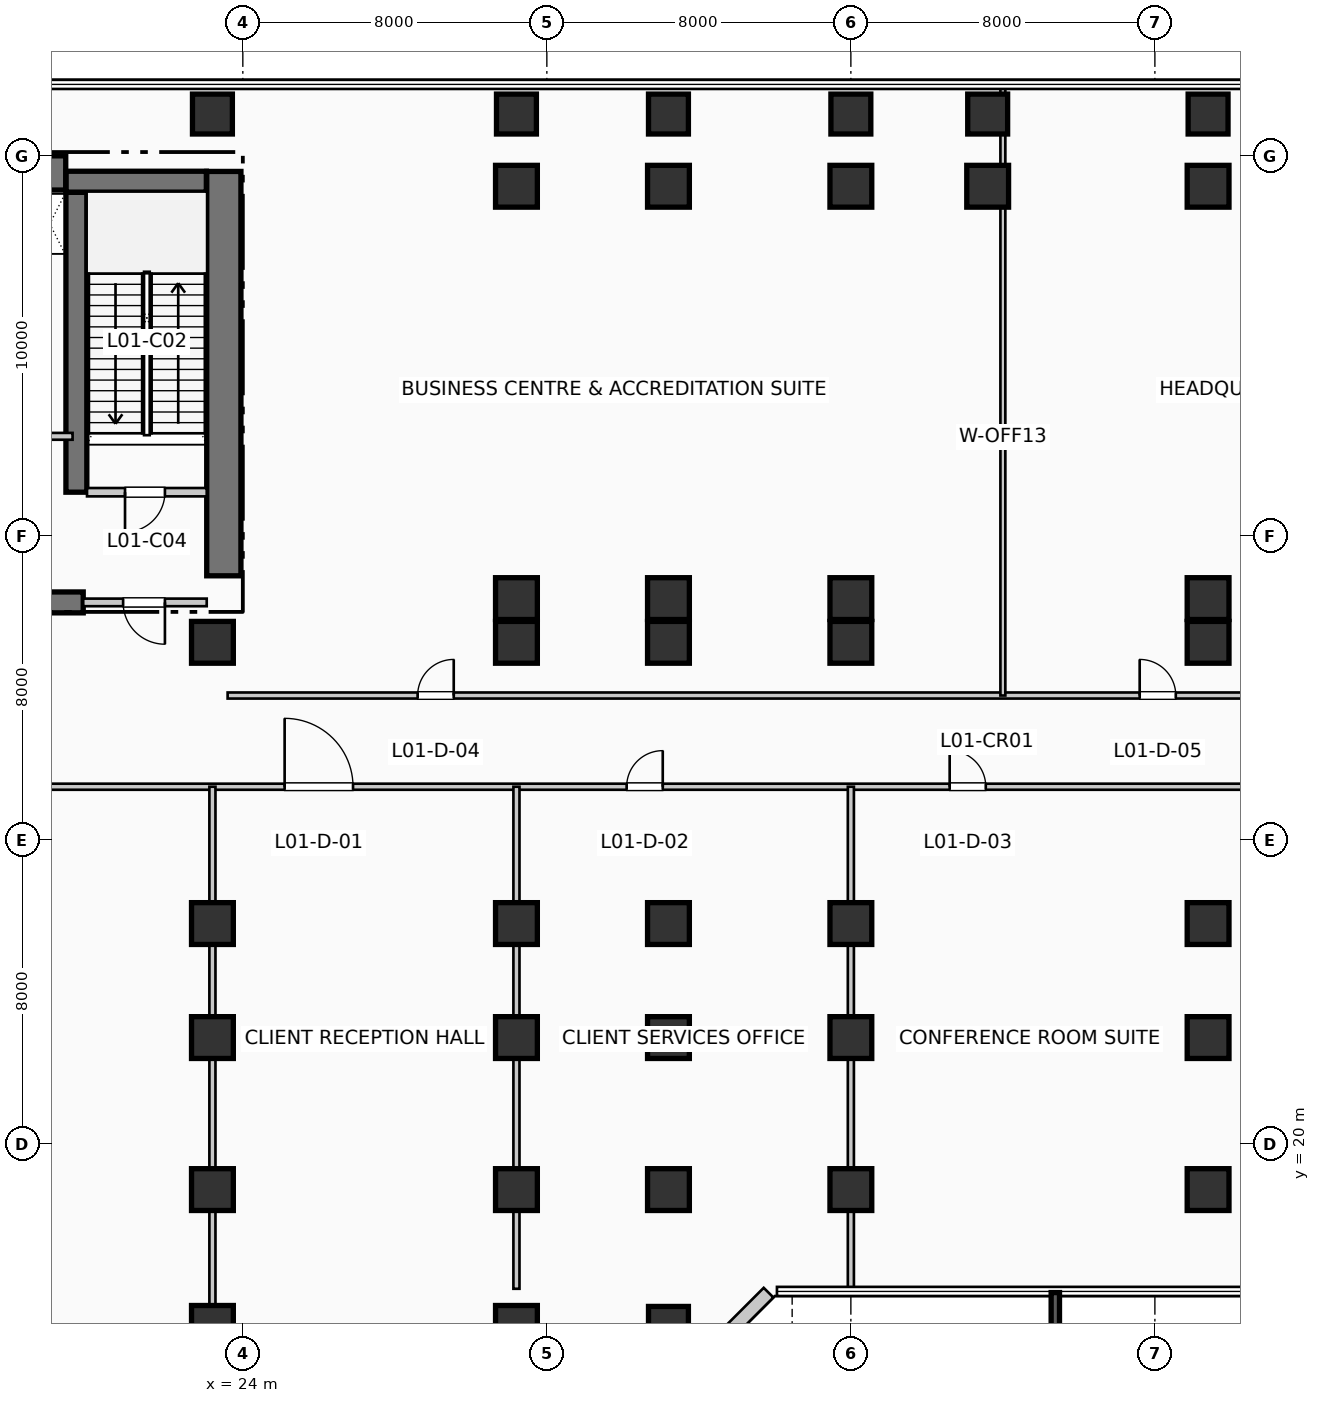
"""IFC4 building model, lengths in metres.
Left out: names, types, materials, properties, quantities, classifications, styles, units other than length and angle.
Written with IfcOpenShell. Run it as: python <this file> out.ifc"""

import sys

from ifc_helpers import new_model, si_unit, direction, frame, frame_2d, origin, origin_2d, place, context, subcontext, project, spatial, rectangle, extrude, element, fill, save


model = new_model("IFC4")
c1 = context("Model", 3, precision=1e-05, world=origin(), true_north=direction((0.0, 1.0)))
c2 = subcontext(c1, "Body", "Model", "MODEL_VIEW")
j1 = project(units=[si_unit("LENGTHUNIT", "METRE"), si_unit("PLANEANGLEUNIT", "RADIAN")], contexts=[c1])
p1 = place(None, origin())
s1 = spatial("IfcSite", under=j1, at=p1, CompositionType="ELEMENT")
p2 = place(p1, origin())
s2 = spatial("IfcBuilding", under=s1, at=p2, CompositionType="ELEMENT")
p3 = place(p2, frame((0.0, 0.0, 5.94)))
s3 = spatial("IfcBuildingStorey", under=s2, at=p3, CompositionType="ELEMENT", Elevation=5.94)
p4 = place(p3, frame((5.36, 45.55, 0.0), z_axis=(0.0, 0.0, 1.0), x_axis=(1.0, 0.0, 0.0)))
e1 = element("IfcWall", 1, at=p4, inside=s3, PredefinedType="SHEAR", context=c2, shape_type="SweptSolid", body=[
    extrude(rectangle(XDim=13.98, YDim=0.9, at=frame_2d((6.99, 0.0))), origin(), (0.0, 0.0, 1.0), 5.28),
])
p5 = place(p3, frame((23.5, 34.95, 0.0), z_axis=(0.0, 0.0, 1.0), x_axis=(0.0, 1.0, 0.0)))
e2 = element("IfcWall", 2, at=p5, inside=s3, PredefinedType="SHEAR", context=c2, shape_type="SweptSolid", body=[
    extrude(rectangle(XDim=10.64, YDim=0.9, at=frame_2d((5.32, 0.0))), origin(), (0.0, 0.0, 1.0), 5.28),
])
p6 = place(p3, frame((13.68, 34.25, 0.0), z_axis=(0.0, 0.0, 1.0), x_axis=(1.0, 0.0, 0.0)))
e3 = element("IfcWall", 3, at=p6, inside=s3, PredefinedType="SHEAR", context=c2, shape_type="SweptSolid", body=[
    extrude(rectangle(XDim=6.12, YDim=0.55, at=frame_2d((3.06, 0.0))), origin(), (0.0, 0.0, 1.0), 5.28),
])
p7 = place(p3, frame((19.62, 37.15, 0.0), z_axis=(0.0, 0.0, 1.0), x_axis=(0.0, 1.0, 0.0)))
e4 = element("IfcWall", 4, at=p7, inside=s3, PredefinedType="SHEAR", context=c2, shape_type="SweptSolid", body=[
    extrude(rectangle(XDim=7.89, YDim=0.55, at=frame_2d((3.945, 0.0))), origin(), (0.0, 0.0, 1.0), 5.28),
])
p8 = place(p3, frame((19.35, 45.32, 0.0), z_axis=(0.0, 0.0, 1.0), x_axis=(1.0, 0.0, 0.0)))
e5 = element("IfcWall", 5, at=p8, inside=s3, PredefinedType="SHEAR", context=c2, shape_type="SweptSolid", body=[
    extrude(rectangle(XDim=3.69, YDim=0.55, at=frame_2d((1.845, 0.0))), origin(), (0.0, 0.0, 1.0), 5.28),
])
for number, where, z_axis, x_axis in (
    (6, (23.2, 15.2, 0.0), (0.0, 0.0, 1.0), (1.0, 0.0, 0.0)),
    (7, (23.2, 18.8, 0.0), (0.0, 0.0, 1.0), (1.0, 0.0, 0.0)),
    (8, (23.2, 22.8, 0.0), (0.0, 0.0, 1.0), (1.0, 0.0, 0.0)),
    (9, (23.2, 25.8, 0.0), (0.0, 0.0, 1.0), (1.0, 0.0, 0.0)),
    (10, (23.2, 33.2, 0.0), (0.0, 0.0, 1.0), (1.0, 0.0, 0.0)),
):
    element("IfcColumn", number, at=place(p3, frame(where, z_axis=z_axis, x_axis=x_axis)), inside=s3, PredefinedType="COLUMN", context=c2, shape_type="SweptSolid", body=[
        extrude(rectangle(XDim=1.1, YDim=1.1, at=origin_2d()), origin(), (0.0, 0.0, 1.0), 5.28),
    ])
p9 = place(p3, frame((23.2, 47.1, 0.0), z_axis=(0.0, 0.0, 1.0), x_axis=(1.0, 0.0, 0.0)))
e11 = element("IfcColumn", 11, at=p9, inside=s3, PredefinedType="COLUMN", context=c2, shape_type="SweptSolid", body=[
    extrude(rectangle(XDim=1.05, YDim=1.05, at=origin_2d()), origin(), (0.0, 0.0, 1.0), 5.28),
])
for number, where, z_axis, x_axis in (
    (12, (31.2, 15.2, 0.0), (0.0, 0.0, 1.0), (1.0, 0.0, 0.0)),
    (13, (31.2, 18.8, 0.0), (0.0, 0.0, 1.0), (1.0, 0.0, 0.0)),
    (14, (31.2, 22.8, 0.0), (0.0, 0.0, 1.0), (1.0, 0.0, 0.0)),
    (15, (31.2, 25.8, 0.0), (0.0, 0.0, 1.0), (1.0, 0.0, 0.0)),
    (16, (31.2, 33.2, 0.0), (0.0, 0.0, 1.0), (1.0, 0.0, 0.0)),
    (17, (31.2, 34.35, 0.0), (0.0, 0.0, 1.0), (1.0, 0.0, 0.0)),
    (18, (31.2, 45.2, 0.0), (0.0, 0.0, 1.0), (1.0, 0.0, 0.0)),
):
    element("IfcColumn", number, at=place(p3, frame(where, z_axis=z_axis, x_axis=x_axis)), inside=s3, PredefinedType="COLUMN", context=c2, shape_type="SweptSolid", body=[
        extrude(rectangle(XDim=1.1, YDim=1.1, at=origin_2d()), origin(), (0.0, 0.0, 1.0), 5.28),
    ])
for number, where, z_axis, x_axis in (
    (19, (31.2, 47.1, 0.0), (0.0, 0.0, 1.0), (1.0, 0.0, 0.0)),
    (20, (35.2, 15.2, 0.0), (0.0, 0.0, 1.0), (1.0, 0.0, 0.0)),
):
    element("IfcColumn", number, at=place(p3, frame(where, z_axis=z_axis, x_axis=x_axis)), inside=s3, PredefinedType="COLUMN", context=c2, shape_type="SweptSolid", body=[
        extrude(rectangle(XDim=1.05, YDim=1.05, at=origin_2d()), origin(), (0.0, 0.0, 1.0), 5.28),
    ])
for number, where, z_axis, x_axis in (
    (21, (35.2, 18.8, 0.0), (0.0, 0.0, 1.0), (1.0, 0.0, 0.0)),
    (22, (35.2, 22.8, 0.0), (0.0, 0.0, 1.0), (1.0, 0.0, 0.0)),
    (23, (35.2, 25.8, 0.0), (0.0, 0.0, 1.0), (1.0, 0.0, 0.0)),
    (24, (35.2, 33.2, 0.0), (0.0, 0.0, 1.0), (1.0, 0.0, 0.0)),
    (25, (35.2, 34.35, 0.0), (0.0, 0.0, 1.0), (1.0, 0.0, 0.0)),
    (26, (35.2, 45.2, 0.0), (0.0, 0.0, 1.0), (1.0, 0.0, 0.0)),
):
    element("IfcColumn", number, at=place(p3, frame(where, z_axis=z_axis, x_axis=x_axis)), inside=s3, PredefinedType="COLUMN", context=c2, shape_type="SweptSolid", body=[
        extrude(rectangle(XDim=1.1, YDim=1.1, at=origin_2d()), origin(), (0.0, 0.0, 1.0), 5.28),
    ])
p10 = place(p3, frame((35.2, 47.1, 0.0), z_axis=(0.0, 0.0, 1.0), x_axis=(1.0, 0.0, 0.0)))
e27 = element("IfcColumn", 27, at=p10, inside=s3, PredefinedType="COLUMN", context=c2, shape_type="SweptSolid", body=[
    extrude(rectangle(XDim=1.05, YDim=1.05, at=origin_2d()), origin(), (0.0, 0.0, 1.0), 5.28),
])
for number, where, z_axis, x_axis in (
    (28, (40.0, 18.8, 0.0), (0.0, 0.0, 1.0), (1.0, 0.0, 0.0)),
    (29, (40.0, 22.8, 0.0), (0.0, 0.0, 1.0), (1.0, 0.0, 0.0)),
    (30, (40.0, 25.8, 0.0), (0.0, 0.0, 1.0), (1.0, 0.0, 0.0)),
    (31, (40.0, 33.2, 0.0), (0.0, 0.0, 1.0), (1.0, 0.0, 0.0)),
    (32, (40.0, 34.35, 0.0), (0.0, 0.0, 1.0), (1.0, 0.0, 0.0)),
    (33, (40.0, 45.2, 0.0), (0.0, 0.0, 1.0), (1.0, 0.0, 0.0)),
):
    element("IfcColumn", number, at=place(p3, frame(where, z_axis=z_axis, x_axis=x_axis)), inside=s3, PredefinedType="COLUMN", context=c2, shape_type="SweptSolid", body=[
        extrude(rectangle(XDim=1.1, YDim=1.1, at=origin_2d()), origin(), (0.0, 0.0, 1.0), 5.28),
    ])
p11 = place(p3, frame((40.0, 47.1, 0.0), z_axis=(0.0, 0.0, 1.0), x_axis=(1.0, 0.0, 0.0)))
e34 = element("IfcColumn", 34, at=p11, inside=s3, PredefinedType="COLUMN", context=c2, shape_type="SweptSolid", body=[
    extrude(rectangle(XDim=1.05, YDim=1.05, at=origin_2d()), origin(), (0.0, 0.0, 1.0), 5.28),
])
p12 = place(p3, frame((43.6, 45.2, 0.0), z_axis=(0.0, 0.0, 1.0), x_axis=(1.0, 0.0, 0.0)))
e35 = element("IfcColumn", 35, at=p12, inside=s3, PredefinedType="COLUMN", context=c2, shape_type="SweptSolid", body=[
    extrude(rectangle(XDim=1.1, YDim=1.1, at=origin_2d()), origin(), (0.0, 0.0, 1.0), 5.28),
])
p13 = place(p3, frame((43.6, 47.1, 0.0), z_axis=(0.0, 0.0, 1.0), x_axis=(1.0, 0.0, 0.0)))
e36 = element("IfcColumn", 36, at=p13, inside=s3, PredefinedType="COLUMN", context=c2, shape_type="SweptSolid", body=[
    extrude(rectangle(XDim=1.05, YDim=1.05, at=origin_2d()), origin(), (0.0, 0.0, 1.0), 5.28),
])
for number, where, z_axis, x_axis in (
    (37, (49.4, 18.8, 0.0), (0.0, 0.0, 1.0), (1.0, 0.0, 0.0)),
    (38, (49.4, 22.8, 0.0), (0.0, 0.0, 1.0), (1.0, 0.0, 0.0)),
    (39, (49.4, 25.8, 0.0), (0.0, 0.0, 1.0), (1.0, 0.0, 0.0)),
    (40, (49.4, 33.2, 0.0), (0.0, 0.0, 1.0), (1.0, 0.0, 0.0)),
    (41, (49.4, 34.35, 0.0), (0.0, 0.0, 1.0), (1.0, 0.0, 0.0)),
    (42, (49.4, 45.2, 0.0), (0.0, 0.0, 1.0), (1.0, 0.0, 0.0)),
):
    element("IfcColumn", number, at=place(p3, frame(where, z_axis=z_axis, x_axis=x_axis)), inside=s3, PredefinedType="COLUMN", context=c2, shape_type="SweptSolid", body=[
        extrude(rectangle(XDim=1.1, YDim=1.1, at=origin_2d()), origin(), (0.0, 0.0, 1.0), 5.28),
    ])
p14 = place(p3, frame((49.4, 47.1, 0.0), z_axis=(0.0, 0.0, 1.0), x_axis=(1.0, 0.0, 0.0)))
e43 = element("IfcColumn", 43, at=p14, inside=s3, PredefinedType="COLUMN", context=c2, shape_type="SweptSolid", body=[
    extrude(rectangle(XDim=1.05, YDim=1.05, at=origin_2d()), origin(), (0.0, 0.0, 1.0), 5.28),
])
p15 = place(p3, frame((35.912, 14.166, 0.0), z_axis=(0.0, 0.0, 1.0), x_axis=(0.707106781187, 0.707106781187, 0.0)))
e44 = element("IfcWall", 44, at=p15, inside=s3, PredefinedType="SOLIDWALL", context=c2, shape_type="SweptSolid", body=[
    extrude(rectangle(XDim=2.718, YDim=0.36, at=frame_2d((1.359, 0.0))), origin(), (0.0, 0.0, 1.0), 4.96),
])
p16 = place(p3, frame((19.9, 37.15, 0.0), z_axis=(0.0, 0.0, 1.0), x_axis=(1.0, 0.0, 0.0)))
e45 = element("IfcWall", 45, at=p16, inside=s3, PredefinedType="PARTITIONING", context=c2, shape_type="SweptSolid", body=[
    extrude(rectangle(XDim=3.15, YDim=0.22, at=frame_2d((1.575, 0.0))), origin(), (0.0, 0.0, 1.0), 4.96),
])
p17 = place(p16, frame((2.05, 0.0, 0.0), z_axis=(0.0, 0.0, 1.0), x_axis=(-1.0, 0.0, 0.0)))
e46 = element("IfcOpeningElement", 46, at=p17, cuts=e45, PredefinedType="OPENING", context=c2, shape_type="SweptSolid", body=[
    extrude(rectangle(XDim=1.05, YDim=2.15, at=frame_2d((0.525, 1.075))), frame((0.0, 0.12, 0.0), z_axis=(0.0, -1.0, 0.0), x_axis=(1.0, 0.0, 0.0)), (0.0, 0.0, 1.0), 0.24),
])
p18 = place(p3, frame((19.8, 34.25, 0.0), z_axis=(0.0, 0.0, 1.0), x_axis=(1.0, 0.0, 0.0)))
e47 = element("IfcWall", 47, at=p18, inside=s3, PredefinedType="PARTITIONING", context=c2, shape_type="SweptSolid", body=[
    extrude(rectangle(XDim=3.25, YDim=0.2, at=frame_2d((1.625, 0.0))), origin(), (0.0, 0.0, 1.0), 4.96),
])
p19 = place(p18, frame((2.15, 0.0, 0.0), z_axis=(0.0, 0.0, 1.0), x_axis=(-1.0, 0.0, 0.0)))
e48 = element("IfcOpeningElement", 48, at=p19, cuts=e47, PredefinedType="OPENING", context=c2, shape_type="SweptSolid", body=[
    extrude(rectangle(XDim=1.1, YDim=2.15, at=frame_2d((0.55, 1.075))), frame((0.0, 0.11, 0.0), z_axis=(0.0, -1.0, 0.0), x_axis=(1.0, 0.0, 0.0)), (0.0, 0.0, 1.0), 0.22),
])
p20 = place(p3, frame((17.68, 38.62, 0.0), z_axis=(0.0, 0.0, 1.0), x_axis=(1.0, 0.0, 0.0)))
e49 = element("IfcWall", 49, at=p20, inside=s3, PredefinedType="PARTITIONING", context=c2, shape_type="SweptSolid", body=[
    extrude(rectangle(XDim=1.84, YDim=0.18, at=frame_2d((0.92, 0.0))), origin(), (0.0, 0.0, 1.0), 4.96),
])
p21 = place(p20, frame((0.24, 0.0, 0.0)))
e50 = element("IfcOpeningElement", 50, at=p21, cuts=e49, PredefinedType="OPENING", context=c2, shape_type="SweptSolid", body=[
    extrude(rectangle(XDim=0.92, YDim=2.1, at=frame_2d((0.46, 1.05))), frame((0.0, 0.1, 0.0), z_axis=(0.0, -1.0, 0.0), x_axis=(1.0, 0.0, 0.0)), (0.0, 0.0, 1.0), 0.2),
])
p22 = place(p3, frame((7.6, 29.4, 0.0), z_axis=(0.0, 0.0, 1.0), x_axis=(1.0, 0.0, 0.0)))
e51 = element("IfcWall", 51, at=p22, inside=s3, PredefinedType="PARTITIONING", context=c2, shape_type="SweptSolid", body=[
    extrude(rectangle(XDim=43.75, YDim=0.16, at=frame_2d((21.875, 0.0))), origin(), (0.0, 0.0, 1.0), 4.615),
])
p23 = place(p22, frame((17.5, 0.0, 0.0)))
e52 = element("IfcOpeningElement", 52, at=p23, cuts=e51, PredefinedType="OPENING", context=c2, shape_type="SweptSolid", body=[
    extrude(rectangle(XDim=1.8, YDim=2.3, at=frame_2d((0.9, 1.15))), frame((0.0, 0.09, 0.0), z_axis=(0.0, -1.0, 0.0), x_axis=(1.0, 0.0, 0.0)), (0.0, 0.0, 1.0), 0.18),
])
p24 = place(p22, frame((1.6, 0.0, 0.0)))
e53 = element("IfcOpeningElement", 53, at=p24, cuts=e51, PredefinedType="OPENING", context=c2, shape_type="SweptSolid", body=[
    extrude(rectangle(XDim=0.95, YDim=2.15, at=frame_2d((0.475, 1.075))), frame((0.0, 0.09, 0.0), z_axis=(0.0, -1.0, 0.0), x_axis=(1.0, 0.0, 0.0)), (0.0, 0.0, 1.0), 0.18),
])
p25 = place(p22, frame((9.0, 0.0, 0.0)))
e54 = element("IfcOpeningElement", 54, at=p25, cuts=e51, PredefinedType="OPENING", context=c2, shape_type="SweptSolid", body=[
    extrude(rectangle(XDim=1.8, YDim=2.3, at=frame_2d((0.9, 1.15))), frame((0.0, 0.09, 0.0), z_axis=(0.0, -1.0, 0.0), x_axis=(1.0, 0.0, 0.0)), (0.0, 0.0, 1.0), 0.18),
])
p26 = place(p22, frame((26.5, 0.0, 0.0)))
e55 = element("IfcOpeningElement", 55, at=p26, cuts=e51, PredefinedType="OPENING", context=c2, shape_type="SweptSolid", body=[
    extrude(rectangle(XDim=0.95, YDim=2.15, at=frame_2d((0.475, 1.075))), frame((0.0, 0.09, 0.0), z_axis=(0.0, -1.0, 0.0), x_axis=(1.0, 0.0, 0.0)), (0.0, 0.0, 1.0), 0.18),
])
p27 = place(p22, frame((35.0, 0.0, 0.0)))
e56 = element("IfcOpeningElement", 56, at=p27, cuts=e51, PredefinedType="OPENING", context=c2, shape_type="SweptSolid", body=[
    extrude(rectangle(XDim=0.95, YDim=2.15, at=frame_2d((0.475, 1.075))), frame((0.0, 0.09, 0.0), z_axis=(0.0, -1.0, 0.0), x_axis=(1.0, 0.0, 0.0)), (0.0, 0.0, 1.0), 0.18),
])
p28 = place(p3, frame((23.2, -1.81, 0.0), z_axis=(0.0, 0.0, 1.0), x_axis=(0.0, 1.0, 0.0)))
e57 = element("IfcWall", 57, at=p28, inside=s3, PredefinedType="PARTITIONING", context=c2, shape_type="SweptSolid", body=[
    extrude(rectangle(XDim=31.21, YDim=0.16, at=frame_2d((15.605, 0.0))), origin(), (0.0, 0.0, 1.0), 4.145),
])
for number, where, z_axis, x_axis in (
    (58, (31.2, 16.19, 0.0), (0.0, 0.0, 1.0), (0.0, 1.0, 0.0)),
    (59, (40.0, 16.19, 0.0), (0.0, 0.0, 1.0), (0.0, 1.0, 0.0)),
):
    element("IfcWall", number, at=place(p3, frame(where, z_axis=z_axis, x_axis=x_axis)), inside=s3, PredefinedType="PARTITIONING", context=c2, shape_type="SweptSolid", body=[
        extrude(rectangle(XDim=13.21, YDim=0.16, at=frame_2d((6.605, 0.0))), origin(), (0.0, 0.0, 1.0), 4.145),
    ])
p29 = place(p3, frame((23.6, 31.8, 0.0), z_axis=(0.0, 0.0, 1.0), x_axis=(1.0, 0.0, 0.0)))
e60 = element("IfcWall", 60, at=p29, inside=s3, PredefinedType="PARTITIONING", context=c2, shape_type="SweptSolid", body=[
    extrude(rectangle(XDim=58.21, YDim=0.16, at=frame_2d((29.105, 0.0))), origin(), (0.0, 0.0, 1.0), 4.96),
])
p30 = place(p29, frame((5.0, 0.0, 0.0)))
e61 = element("IfcOpeningElement", 61, at=p30, cuts=e60, PredefinedType="OPENING", context=c2, shape_type="SweptSolid", body=[
    extrude(rectangle(XDim=0.95, YDim=2.15, at=frame_2d((0.475, 1.075))), frame((0.0, 0.09, 0.0), z_axis=(0.0, -1.0, 0.0), x_axis=(1.0, 0.0, 0.0)), (0.0, 0.0, 1.0), 0.18),
])
p31 = place(p29, frame((24.0, 0.0, 0.0)))
e62 = element("IfcOpeningElement", 62, at=p31, cuts=e60, PredefinedType="OPENING", context=c2, shape_type="SweptSolid", body=[
    extrude(rectangle(XDim=0.95, YDim=2.15, at=frame_2d((0.475, 1.075))), frame((0.0, 0.09, 0.0), z_axis=(0.0, -1.0, 0.0), x_axis=(1.0, 0.0, 0.0)), (0.0, 0.0, 1.0), 0.18),
])
p32 = place(p29, frame((44.0, 0.0, 0.0)))
e63 = element("IfcOpeningElement", 63, at=p32, cuts=e60, PredefinedType="OPENING", context=c2, shape_type="SweptSolid", body=[
    extrude(rectangle(XDim=0.95, YDim=2.15, at=frame_2d((0.475, 1.075))), frame((0.0, 0.09, 0.0), z_axis=(0.0, -1.0, 0.0), x_axis=(1.0, 0.0, 0.0)), (0.0, 0.0, 1.0), 0.18),
])
p33 = place(p3, frame((44.0, 31.8, 0.0), z_axis=(0.0, 0.0, 1.0), x_axis=(0.0, 1.0, 0.0)))
e64 = element("IfcWall", 64, at=p33, inside=s3, PredefinedType="PARTITIONING", context=c2, shape_type="SweptSolid", body=[
    extrude(rectangle(XDim=16.01, YDim=0.13, at=frame_2d((8.005, 0.0))), origin(), (0.0, 0.0, 1.0), 4.96),
])
p34 = place(p17, origin())
e65 = element("IfcDoor", 65, at=p34, inside=s3, OperationType="SINGLE_SWING_LEFT", PredefinedType="DOOR", context=c2, shape_type="SweptSolid", body=[
    extrude(rectangle(XDim=1.05, YDim=2.15, at=frame_2d((0.525, 1.075))), frame((0.0, 0.025, 0.0), z_axis=(0.0, -1.0, 0.0), x_axis=(1.0, 0.0, 0.0)), (0.0, 0.0, 1.0), 0.05),
])
fill(e46, e65)
p35 = place(p19, origin())
e66 = element("IfcDoor", 66, at=p35, inside=s3, OperationType="SINGLE_SWING_RIGHT", PredefinedType="DOOR", context=c2, shape_type="SweptSolid", body=[
    extrude(rectangle(XDim=1.1, YDim=2.15, at=frame_2d((0.55, 1.075))), frame((0.0, 0.025, 0.0), z_axis=(0.0, -1.0, 0.0), x_axis=(1.0, 0.0, 0.0)), (0.0, 0.0, 1.0), 0.05),
])
fill(e48, e66)
p36 = place(p23, origin())
e67 = element("IfcDoor", 67, at=p36, inside=s3, OperationType="SINGLE_SWING_LEFT", PredefinedType="DOOR", context=c2, shape_type="SweptSolid", body=[
    extrude(rectangle(XDim=1.8, YDim=2.3, at=frame_2d((0.9, 1.15))), frame((0.0, 0.025, 0.0), z_axis=(0.0, -1.0, 0.0), x_axis=(1.0, 0.0, 0.0)), (0.0, 0.0, 1.0), 0.05),
])
fill(e52, e67)
p37 = place(p26, origin())
e68 = element("IfcDoor", 68, at=p37, inside=s3, OperationType="SINGLE_SWING_RIGHT", PredefinedType="DOOR", context=c2, shape_type="SweptSolid", body=[
    extrude(rectangle(XDim=0.95, YDim=2.15, at=frame_2d((0.475, 1.075))), frame((0.0, 0.025, 0.0), z_axis=(0.0, -1.0, 0.0), x_axis=(1.0, 0.0, 0.0)), (0.0, 0.0, 1.0), 0.05),
])
fill(e55, e68)
p38 = place(p27, origin())
e69 = element("IfcDoor", 69, at=p38, inside=s3, OperationType="SINGLE_SWING_LEFT", PredefinedType="DOOR", context=c2, shape_type="SweptSolid", body=[
    extrude(rectangle(XDim=0.95, YDim=2.15, at=frame_2d((0.475, 1.075))), frame((0.0, 0.025, 0.0), z_axis=(0.0, -1.0, 0.0), x_axis=(1.0, 0.0, 0.0)), (0.0, 0.0, 1.0), 0.05),
])
fill(e56, e69)
p39 = place(p30, origin())
e70 = element("IfcDoor", 70, at=p39, inside=s3, OperationType="SINGLE_SWING_RIGHT", PredefinedType="DOOR", context=c2, shape_type="SweptSolid", body=[
    extrude(rectangle(XDim=0.95, YDim=2.15, at=frame_2d((0.475, 1.075))), frame((0.0, 0.025, 0.0), z_axis=(0.0, -1.0, 0.0), x_axis=(1.0, 0.0, 0.0)), (0.0, 0.0, 1.0), 0.05),
])
fill(e61, e70)
p40 = place(p31, origin())
e71 = element("IfcDoor", 71, at=p40, inside=s3, OperationType="SINGLE_SWING_LEFT", PredefinedType="DOOR", context=c2, shape_type="SweptSolid", body=[
    extrude(rectangle(XDim=0.95, YDim=2.15, at=frame_2d((0.475, 1.075))), frame((0.0, 0.025, 0.0), z_axis=(0.0, -1.0, 0.0), x_axis=(1.0, 0.0, 0.0)), (0.0, 0.0, 1.0), 0.05),
])
fill(e62, e71)
save(model, sys.argv[1])
